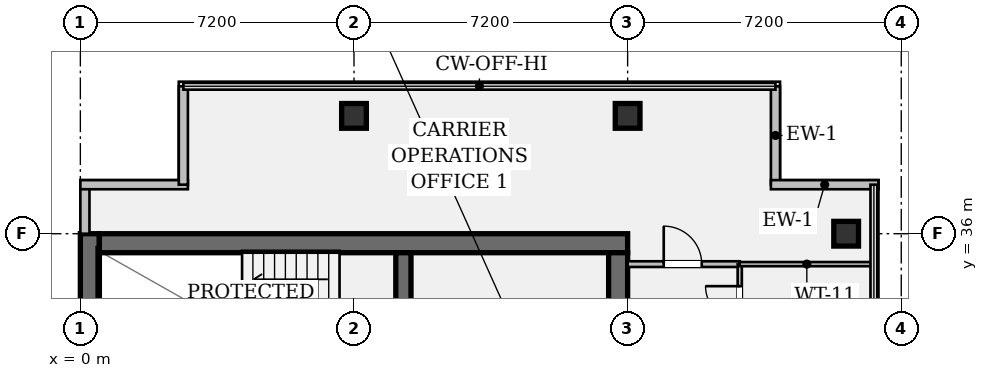
"""IFC4 building model, lengths in metres.
Left out: names, types, materials, properties, quantities, classifications, styles, units other than length and angle.
Written with IfcOpenShell. Run it as: python <this file> out.ifc"""

import sys

from ifc_helpers import new_model, si_unit, direction, frame, frame_2d, origin, origin_2d, place, context, subcontext, project, spatial, rectangle, hollow_rectangle, extrude, element, fill, save


model = new_model("IFC4")
c1 = context("Model", 3, precision=1e-05, world=origin(), true_north=direction((0.0, 1.0)))
c2 = subcontext(c1, "Body", "Model", "MODEL_VIEW")
j1 = project(units=[si_unit("LENGTHUNIT", "METRE"), si_unit("PLANEANGLEUNIT", "RADIAN")], contexts=[c1])
p1 = place(None, origin())
s1 = spatial("IfcSite", under=j1, at=p1, CompositionType="ELEMENT")
p2 = place(p1, origin())
s2 = spatial("IfcBuilding", under=s1, at=p2, CompositionType="ELEMENT")
p3 = place(p2, frame((0.0, 0.0, 262.15)))
s3 = spatial("IfcBuildingStorey", under=s2, at=p3, CompositionType="ELEMENT", Elevation=262.15)
p4 = place(p3, frame((0.25, 7.2, 0.0), z_axis=(0.0, 0.0, 1.0), x_axis=(0.0, 1.0, 0.0)))
e1 = element("IfcWall", 1, at=p4, inside=s3, PredefinedType="SHEAR", context=c2, shape_type="SweptSolid", body=[
    extrude(rectangle(XDim=28.8, YDim=0.5, at=frame_2d((14.4, 0.0))), origin(), (0.0, 0.0, 1.0), 3.24),
])
p5 = place(p3, frame((0.5, 35.75, 0.0), z_axis=(0.0, 0.0, 1.0), x_axis=(1.0, 0.0, 0.0)))
e2 = element("IfcWall", 2, at=p5, inside=s3, PredefinedType="SHEAR", context=c2, shape_type="SweptSolid", body=[
    extrude(rectangle(XDim=13.9, YDim=0.5, at=frame_2d((6.95, 0.0))), origin(), (0.0, 0.0, 1.0), 3.24),
])
p6 = place(p3, frame((14.15, 35.5, 0.0), z_axis=(0.0, 0.0, 1.0), x_axis=(0.0, -1.0, 0.0)))
e3 = element("IfcWall", 3, at=p6, inside=s3, PredefinedType="SHEAR", context=c2, shape_type="SweptSolid", body=[
    extrude(rectangle(XDim=27.8, YDim=0.5, at=frame_2d((13.9, 0.0))), origin(), (0.0, 0.0, 1.0), 3.24),
])
p7 = place(p6, frame((1.4, 0.0, 0.0)))
e4 = element("IfcOpeningElement", 4, at=p7, cuts=e3, PredefinedType="OPENING", context=c2, shape_type="SweptSolid", body=[
    extrude(rectangle(XDim=1.2, YDim=2.15, at=frame_2d((0.6, 1.075))), frame((0.0, 0.262, 0.0), z_axis=(0.0, -1.0, 0.0), x_axis=(1.0, 0.0, 0.0)), (0.0, 0.0, 1.0), 0.524),
])
p8 = place(p6, frame((25.35, 0.0, 0.0)))
e5 = element("IfcOpeningElement", 5, at=p8, cuts=e3, PredefinedType="OPENING", context=c2, shape_type="SweptSolid", body=[
    extrude(rectangle(XDim=1.2, YDim=2.15, at=frame_2d((0.6, 1.075))), frame((0.0, 0.262, 0.0), z_axis=(0.0, -1.0, 0.0), x_axis=(1.0, 0.0, 0.0)), (0.0, 0.0, 1.0), 0.524),
])
p9 = place(p6, frame((14.7, 0.0, 0.0)))
e6 = element("IfcOpeningElement", 6, at=p9, cuts=e3, PredefinedType="OPENING", context=c2, shape_type="SweptSolid", body=[
    extrude(rectangle(XDim=1.6, YDim=2.2, at=frame_2d((0.8, 1.1))), frame((0.0, 0.262, 0.0), z_axis=(0.0, -1.0, 0.0), x_axis=(1.0, 0.0, 0.0)), (0.0, 0.0, 1.0), 0.524),
])
p10 = place(p3, frame((8.5, 31.72, 0.0), z_axis=(0.0, 0.0, 1.0), x_axis=(0.0, 1.0, 0.0)))
e7 = element("IfcWall", 7, at=p10, inside=s3, PredefinedType="SHEAR", context=c2, shape_type="SweptSolid", body=[
    extrude(rectangle(XDim=3.78, YDim=0.4, at=frame_2d((1.89, 0.0))), origin(), (0.0, 0.0, 1.0), 3.24),
])
p11 = place(p10, frame((0.9, 0.0, 0.0)))
e8 = element("IfcOpeningElement", 8, at=p11, cuts=e7, PredefinedType="OPENING", context=c2, shape_type="SweptSolid", body=[
    extrude(rectangle(XDim=1.1, YDim=2.15, at=frame_2d((0.55, 1.075))), frame((0.0, 0.212, 0.0), z_axis=(0.0, -1.0, 0.0), x_axis=(1.0, 0.0, 0.0)), (0.0, 0.0, 1.0), 0.424),
])
for number, where, z_axis, x_axis in (
    (9, (7.2, 39.1, 0.0), (0.0, 0.0, 1.0), (1.0, 0.0, 0.0)),
    (10, (14.4, 39.1, 0.0), (0.0, 0.0, 1.0), (1.0, 0.0, 0.0)),
    (11, (20.15, 36.0, 0.0), (0.0, 0.0, 1.0), (1.0, 0.0, 0.0)),
):
    element("IfcColumn", number, at=place(p3, frame(where, z_axis=z_axis, x_axis=x_axis)), inside=s3, PredefinedType="COLUMN", context=c2, shape_type="SweptSolid", body=[
        extrude(hollow_rectangle(XDim=0.65, YDim=0.65, WallThickness=0.04, at=origin_2d()), origin(), (0.0, 0.0, 1.0), 3.24),
    ])
p12 = place(p3, frame((0.12, 36.0, 0.0), z_axis=(0.0, 0.0, 1.0), x_axis=(0.0, 1.0, 0.0)))
e12 = element("IfcWall", 12, at=p12, inside=s3, PredefinedType="STANDARD", context=c2, shape_type="SweptSolid", body=[
    extrude(rectangle(XDim=1.29, YDim=0.24, at=frame_2d((0.645, 0.0))), origin(), (0.0, 0.0, 1.0), 3.24),
])
p13 = place(p3, frame((0.0, 37.29, 0.0), z_axis=(0.0, 0.0, 1.0), x_axis=(1.0, 0.0, 0.0)))
e13 = element("IfcWall", 13, at=p13, inside=s3, PredefinedType="STANDARD", context=c2, shape_type="SweptSolid", body=[
    extrude(rectangle(XDim=2.83, YDim=0.24, at=frame_2d((1.415, 0.0))), origin(), (0.0, 0.0, 1.0), 3.24),
])
for number, where, z_axis, x_axis in (
    (14, (2.71, 37.29, 0.0), (0.0, 0.0, 1.0), (0.0, 1.0, 0.0)),
    (15, (18.29, 39.88, 0.0), (0.0, 0.0, 1.0), (0.0, -1.0, 0.0)),
):
    element("IfcWall", number, at=place(p3, frame(where, z_axis=z_axis, x_axis=x_axis)), inside=s3, PredefinedType="STANDARD", context=c2, shape_type="SweptSolid", body=[
        extrude(rectangle(XDim=2.59, YDim=0.24, at=frame_2d((1.295, 0.0))), origin(), (0.0, 0.0, 1.0), 3.24),
    ])
p14 = place(p3, frame((18.17, 37.29, 0.0), z_axis=(0.0, 0.0, 1.0), x_axis=(1.0, 0.0, 0.0)))
e16 = element("IfcWall", 16, at=p14, inside=s3, PredefinedType="STANDARD", context=c2, shape_type="SweptSolid", body=[
    extrude(rectangle(XDim=2.83, YDim=0.24, at=frame_2d((1.415, 0.0))), origin(), (0.0, 0.0, 1.0), 3.24),
])
p15 = place(p3, frame((14.4, 35.2, 0.0), z_axis=(0.0, 0.0, 1.0), x_axis=(1.0, 0.0, 0.0)))
e17 = element("IfcWall", 17, at=p15, inside=s3, PredefinedType="PARTITIONING", context=c2, shape_type="SweptSolid", body=[
    extrude(rectangle(XDim=2.95, YDim=0.15, at=frame_2d((1.475, 0.0))), origin(), (0.0, 0.0, 1.0), 2.808),
])
p16 = place(p15, frame((0.95, 0.0, 0.0)))
e18 = element("IfcOpeningElement", 18, at=p16, cuts=e17, PredefinedType="OPENING", context=c2, shape_type="SweptSolid", body=[
    extrude(rectangle(XDim=1.0, YDim=2.15, at=frame_2d((0.5, 1.075))), frame((0.0, 0.087, 0.0), z_axis=(0.0, -1.0, 0.0), x_axis=(1.0, 0.0, 0.0)), (0.0, 0.0, 1.0), 0.174),
])
p17 = place(p3, frame((17.35, 19.95, 0.0), z_axis=(0.0, 0.0, 1.0), x_axis=(0.0, 1.0, 0.0)))
e19 = element("IfcWall", 19, at=p17, inside=s3, PredefinedType="PARTITIONING", context=c2, shape_type="SweptSolid", body=[
    extrude(rectangle(XDim=15.25, YDim=0.11, at=frame_2d((7.625, 0.0))), origin(), (0.0, 0.0, 1.0), 2.676),
])
p18 = place(p17, frame((4.02, 0.0, 0.0)))
e20 = element("IfcOpeningElement", 20, at=p18, cuts=e19, PredefinedType="OPENING", context=c2, shape_type="SweptSolid", body=[
    extrude(rectangle(XDim=0.9, YDim=2.15, at=frame_2d((0.45, 1.075))), frame((0.0, 0.067, 0.0), z_axis=(0.0, -1.0, 0.0), x_axis=(1.0, 0.0, 0.0)), (0.0, 0.0, 1.0), 0.134),
])
p19 = place(p17, frame((7.27, 0.0, 0.0)))
e21 = element("IfcOpeningElement", 21, at=p19, cuts=e19, PredefinedType="OPENING", context=c2, shape_type="SweptSolid", body=[
    extrude(rectangle(XDim=0.9, YDim=2.15, at=frame_2d((0.45, 1.075))), frame((0.0, 0.067, 0.0), z_axis=(0.0, -1.0, 0.0), x_axis=(1.0, 0.0, 0.0)), (0.0, 0.0, 1.0), 0.134),
])
p20 = place(p17, frame((10.52, 0.0, 0.0)))
e22 = element("IfcOpeningElement", 22, at=p20, cuts=e19, PredefinedType="OPENING", context=c2, shape_type="SweptSolid", body=[
    extrude(rectangle(XDim=0.9, YDim=2.15, at=frame_2d((0.45, 1.075))), frame((0.0, 0.067, 0.0), z_axis=(0.0, -1.0, 0.0), x_axis=(1.0, 0.0, 0.0)), (0.0, 0.0, 1.0), 0.134),
])
p21 = place(p17, frame((13.77, 0.0, 0.0)))
e23 = element("IfcOpeningElement", 23, at=p21, cuts=e19, PredefinedType="OPENING", context=c2, shape_type="SweptSolid", body=[
    extrude(rectangle(XDim=0.9, YDim=2.15, at=frame_2d((0.45, 1.075))), frame((0.0, 0.067, 0.0), z_axis=(0.0, -1.0, 0.0), x_axis=(1.0, 0.0, 0.0)), (0.0, 0.0, 1.0), 0.134),
])
p22 = place(p3, frame((17.35, 35.2, 0.0), z_axis=(0.0, 0.0, 1.0), x_axis=(1.0, 0.0, 0.0)))
e24 = element("IfcWall", 24, at=p22, inside=s3, PredefinedType="PARTITIONING", context=c2, shape_type="SweptSolid", body=[
    extrude(rectangle(XDim=3.53, YDim=0.11, at=frame_2d((1.765, 0.0))), origin(), (0.0, 0.0, 1.0), 2.808),
])
p23 = place(p3, frame((20.9, 22.7, 0.0), z_axis=(0.0, 0.0, 1.0), x_axis=(0.0, 1.0, 0.0)))
e25 = element("IfcWall", 25, at=p23, inside=s3, PredefinedType="PARTITIONING", context=c2, shape_type="SweptSolid", body=[
    extrude(rectangle(XDim=12.5, YDim=0.15, at=frame_2d((6.25, 0.0))), origin(), (0.0, 0.0, 1.0), 3.24),
])
p24 = place(p16, origin())
e26 = element("IfcDoor", 26, at=p24, inside=s3, OperationType="SINGLE_SWING_LEFT", PredefinedType="DOOR", context=c2, shape_type="SweptSolid", body=[
    extrude(rectangle(XDim=1.0, YDim=2.15, at=frame_2d((0.5, 1.075))), frame((0.0, 0.025, 0.0), z_axis=(0.0, -1.0, 0.0), x_axis=(1.0, 0.0, 0.0)), (0.0, 0.0, 1.0), 0.05),
])
fill(e18, e26)
p25 = place(p21, origin())
e27 = element("IfcDoor", 27, at=p25, inside=s3, OperationType="SINGLE_SWING_RIGHT", PredefinedType="DOOR", context=c2, shape_type="SweptSolid", body=[
    extrude(rectangle(XDim=0.9, YDim=2.15, at=frame_2d((0.45, 1.075))), frame((0.0, 0.025, 0.0), z_axis=(0.0, -1.0, 0.0), x_axis=(1.0, 0.0, 0.0)), (0.0, 0.0, 1.0), 0.05),
])
fill(e23, e27)
save(model, sys.argv[1])
